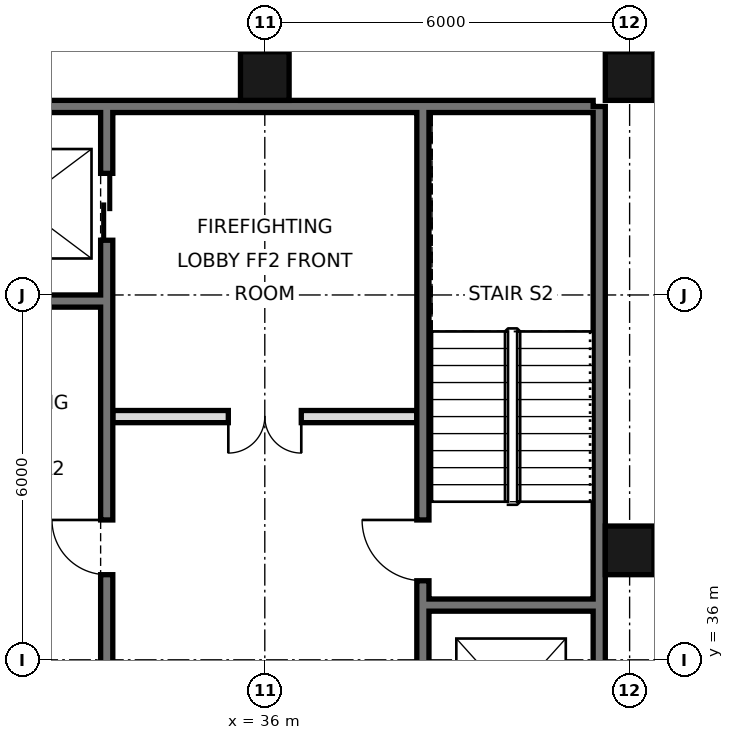
"""IFC4 building model, lengths in metres.
Left out: names, types, materials, properties, quantities, classifications, styles, units other than length and angle.
Written with IfcOpenShell. Run it as: python <this file> out.ifc"""

import sys

from ifc_helpers import new_model, si_unit, direction, frame, frame_2d, origin, origin_2d, place, context, subcontext, project, spatial, rectangle, hollow_rectangle, extrude, element, fill, save


model = new_model("IFC4")
c1 = context("Model", 3, precision=1e-05, world=origin(), true_north=direction((0.0, 1.0)))
c2 = subcontext(c1, "Body", "Model", "MODEL_VIEW")
j1 = project(units=[si_unit("LENGTHUNIT", "METRE"), si_unit("PLANEANGLEUNIT", "RADIAN")], contexts=[c1])
p1 = place(None, origin())
s1 = spatial("IfcSite", under=j1, at=p1, CompositionType="ELEMENT")
p2 = place(p1, origin())
s2 = spatial("IfcBuilding", under=s1, at=p2, CompositionType="ELEMENT")
p3 = place(p2, frame((0.0, 0.0, 239.6)))
s3 = spatial("IfcBuildingStorey", under=s2, at=p3, CompositionType="ELEMENT", Elevation=239.6)
for number, where, z_axis, x_axis in (
    (1, (36.0, 45.6, 0.0), (0.0, 0.0, 1.0), (1.0, 0.0, 0.0)),
    (2, (42.0, 37.8, 0.0), (0.0, 0.0, 1.0), (1.0, 0.0, 0.0)),
    (3, (42.0, 45.6, 0.0), (0.0, 0.0, 1.0), (1.0, 0.0, 0.0)),
):
    element("IfcColumn", number, at=place(p3, frame(where, z_axis=z_axis, x_axis=x_axis)), inside=s3, PredefinedType="COLUMN", context=c2, shape_type="SweptSolid", body=[
        extrude(hollow_rectangle(XDim=0.8, YDim=0.8, WallThickness=0.04, at=origin_2d()), origin(), (0.0, 0.0, 1.0), 3.6),
    ])
p4 = place(p3, frame((41.5, 21.6, 0.0), z_axis=(0.0, 0.0, 1.0), x_axis=(0.0, 1.0, 0.0)))
e4 = element("IfcWall", 4, at=p4, inside=s3, PredefinedType="SOLIDWALL", context=c2, shape_type="SweptSolid", body=[
    extrude(rectangle(XDim=23.5, YDim=0.2, at=frame_2d((11.75, 0.0))), origin(), (0.0, 0.0, 1.0), 3.42),
])
p5 = place(p3, frame((6.6, 45.1, 0.0), z_axis=(0.0, 0.0, 1.0), x_axis=(1.0, 0.0, 0.0)))
e5 = element("IfcWall", 5, at=p5, inside=s3, PredefinedType="SOLIDWALL", context=c2, shape_type="SweptSolid", body=[
    extrude(rectangle(XDim=34.8, YDim=0.2, at=frame_2d((17.4, 0.0))), origin(), (0.0, 0.0, 1.0), 3.42),
])
p6 = place(p3, frame((33.4, 27.5, 0.0), z_axis=(0.0, 0.0, 1.0), x_axis=(0.0, 1.0, 0.0)))
e6 = element("IfcWall", 6, at=p6, inside=s3, PredefinedType="SOLIDWALL", context=c2, shape_type="SweptSolid", body=[
    extrude(rectangle(XDim=17.5, YDim=0.2, at=frame_2d((8.75, 0.0))), origin(), (0.0, 0.0, 1.0), 3.42),
])
p7 = place(p6, frame((1.1, 0.0, 0.0)))
e7 = element("IfcOpeningElement", 7, at=p7, cuts=e6, PredefinedType="OPENING", context=c2, shape_type="SweptSolid", body=[
    extrude(rectangle(XDim=1.1, YDim=2.1, at=frame_2d((0.55, 1.05))), frame((0.0, 0.11, 0.0), z_axis=(0.0, -1.0, 0.0), x_axis=(1.0, 0.0, 0.0)), (0.0, 0.0, 1.0), 0.22),
])
p8 = place(p6, frame((4.2, 0.0, 0.0)))
e8 = element("IfcOpeningElement", 8, at=p8, cuts=e6, PredefinedType="OPENING", context=c2, shape_type="SweptSolid", body=[
    extrude(rectangle(XDim=1.1, YDim=2.1, at=frame_2d((0.55, 1.05))), frame((0.0, 0.11, 0.0), z_axis=(0.0, -1.0, 0.0), x_axis=(1.0, 0.0, 0.0)), (0.0, 0.0, 1.0), 0.22),
])
p9 = place(p6, frame((15.4, 0.0, 0.0)))
e9 = element("IfcOpeningElement", 9, at=p9, cuts=e6, PredefinedType="OPENING", context=c2, shape_type="SweptSolid", body=[
    extrude(rectangle(XDim=1.1, YDim=2.1, at=frame_2d((0.55, 1.05))), frame((0.0, 0.11, 0.0), z_axis=(0.0, -1.0, 0.0), x_axis=(1.0, 0.0, 0.0)), (0.0, 0.0, 1.0), 0.22),
])
p10 = place(p6, frame((9.9, 0.0, 0.0)))
e10 = element("IfcOpeningElement", 10, at=p10, cuts=e6, PredefinedType="OPENING", context=c2, shape_type="SweptSolid", body=[
    extrude(rectangle(XDim=0.9, YDim=2.1, at=frame_2d((0.45, 1.05))), frame((0.0, 0.11, 0.0), z_axis=(0.0, -1.0, 0.0), x_axis=(1.0, 0.0, 0.0)), (0.0, 0.0, 1.0), 0.22),
])
p11 = place(p3, frame((38.6, 21.6, 0.0), z_axis=(0.0, 0.0, 1.0), x_axis=(0.0, 1.0, 0.0)))
e11 = element("IfcWall", 11, at=p11, inside=s3, PredefinedType="SOLIDWALL", context=c2, shape_type="SweptSolid", body=[
    extrude(rectangle(XDim=23.4, YDim=0.2, at=frame_2d((11.7, 0.0))), origin(), (0.0, 0.0, 1.0), 3.42),
])
p12 = place(p11, frame((7.0, 0.0, 0.0)))
e12 = element("IfcOpeningElement", 12, at=p12, cuts=e11, PredefinedType="OPENING", context=c2, shape_type="SweptSolid", body=[
    extrude(rectangle(XDim=1.1, YDim=2.1, at=frame_2d((0.55, 1.05))), frame((0.0, 0.11, 0.0), z_axis=(0.0, -1.0, 0.0), x_axis=(1.0, 0.0, 0.0)), (0.0, 0.0, 1.0), 0.22),
])
p13 = place(p11, frame((10.1, 0.0, 0.0)))
e13 = element("IfcOpeningElement", 13, at=p13, cuts=e11, PredefinedType="OPENING", context=c2, shape_type="SweptSolid", body=[
    extrude(rectangle(XDim=1.1, YDim=2.1, at=frame_2d((0.55, 1.05))), frame((0.0, 0.11, 0.0), z_axis=(0.0, -1.0, 0.0), x_axis=(1.0, 0.0, 0.0)), (0.0, 0.0, 1.0), 0.22),
])
p14 = place(p11, frame((13.2, 0.0, 0.0)))
e14 = element("IfcOpeningElement", 14, at=p14, cuts=e11, PredefinedType="OPENING", context=c2, shape_type="SweptSolid", body=[
    extrude(rectangle(XDim=1.1, YDim=2.1, at=frame_2d((0.55, 1.05))), frame((0.0, 0.11, 0.0), z_axis=(0.0, -1.0, 0.0), x_axis=(1.0, 0.0, 0.0)), (0.0, 0.0, 1.0), 0.22),
])
p15 = place(p11, frame((15.7, 0.0, 0.0)))
e15 = element("IfcOpeningElement", 15, at=p15, cuts=e11, PredefinedType="OPENING", context=c2, shape_type="SweptSolid", body=[
    extrude(rectangle(XDim=1.0, YDim=2.1, at=frame_2d((0.5, 1.05))), frame((0.0, 0.11, 0.0), z_axis=(0.0, -1.0, 0.0), x_axis=(1.0, 0.0, 0.0)), (0.0, 0.0, 1.0), 0.22),
])
p16 = place(p11, frame((0.175, 0.0, 0.0)))
e16 = element("IfcOpeningElement", 16, at=p16, cuts=e11, PredefinedType="OPENING", context=c2, shape_type="SweptSolid", body=[
    extrude(rectangle(XDim=0.9, YDim=2.1, at=frame_2d((0.45, 1.05))), frame((0.0, 0.11, 0.0), z_axis=(0.0, -1.0, 0.0), x_axis=(1.0, 0.0, 0.0)), (0.0, 0.0, 1.0), 0.22),
])
p17 = place(p3, frame((38.7, 36.9, 0.0), z_axis=(0.0, 0.0, 1.0), x_axis=(1.0, 0.0, 0.0)))
e17 = element("IfcWall", 17, at=p17, inside=s3, PredefinedType="SOLIDWALL", context=c2, shape_type="SweptSolid", body=[
    extrude(rectangle(XDim=2.7, YDim=0.2, at=frame_2d((1.35, 0.0))), origin(), (0.0, 0.0, 1.0), 3.42),
])
p18 = place(p3, frame((33.5, 40.0, 0.0), z_axis=(0.0, 0.0, 1.0), x_axis=(1.0, 0.0, 0.0)))
e18 = element("IfcWall", 18, at=p18, inside=s3, PredefinedType="PARTITIONING", context=c2, shape_type="SweptSolid", body=[
    extrude(rectangle(XDim=5.0, YDim=0.2, at=frame_2d((2.5, 0.0))), origin(), (0.0, 0.0, 1.0), 3.42),
])
p19 = place(p18, frame((1.9, 0.0, 0.0)))
e19 = element("IfcOpeningElement", 19, at=p19, cuts=e18, PredefinedType="OPENING", context=c2, shape_type="SweptSolid", body=[
    extrude(rectangle(XDim=1.2, YDim=2.1, at=frame_2d((0.6, 1.05))), frame((0.0, 0.11, 0.0), z_axis=(0.0, -1.0, 0.0), x_axis=(1.0, 0.0, 0.0)), (0.0, 0.0, 1.0), 0.22),
])
p20 = place(p3, frame((30.6, 41.9, 0.0), z_axis=(0.0, 0.0, 1.0), x_axis=(1.0, 0.0, 0.0)))
e20 = element("IfcWall", 20, at=p20, inside=s3, PredefinedType="SOLIDWALL", context=c2, shape_type="SweptSolid", body=[
    extrude(rectangle(XDim=2.7, YDim=0.2, at=frame_2d((1.35, 0.0))), origin(), (0.0, 0.0, 1.0), 3.42),
])
p21 = place(p19, frame((1.2, 0.0, 0.0), z_axis=(0.0, 0.0, 1.0), x_axis=(-1.0, 0.0, 0.0)))
e21 = element("IfcDoor", 21, at=p21, inside=s3, OperationType="DOUBLE_DOOR_SINGLE_SWING", PredefinedType="DOOR", context=c2, shape_type="SweptSolid", body=[
    extrude(rectangle(XDim=1.2, YDim=2.1, at=frame_2d((0.6, 1.05))), frame((0.0, 0.025, 0.0), z_axis=(0.0, -1.0, 0.0), x_axis=(1.0, 0.0, 0.0)), (0.0, 0.0, 1.0), 0.05),
])
fill(e19, e21)
p22 = place(p9, origin())
e22 = element("IfcDoor", 22, at=p22, inside=s3, OperationType="DOUBLE_DOOR_SLIDING", PredefinedType="DOOR", context=c2, shape_type="SweptSolid", body=[
    extrude(rectangle(XDim=1.1, YDim=2.1, at=frame_2d((0.55, 1.05))), frame((0.0, 0.025, 0.0), z_axis=(0.0, -1.0, 0.0), x_axis=(1.0, 0.0, 0.0)), (0.0, 0.0, 1.0), 0.05),
])
fill(e9, e22)
p23 = place(p15, frame((1.0, 0.0, 0.0), z_axis=(0.0, 0.0, 1.0), x_axis=(-1.0, 0.0, 0.0)))
e23 = element("IfcDoor", 23, at=p23, inside=s3, OperationType="SINGLE_SWING_LEFT", PredefinedType="DOOR", context=c2, shape_type="SweptSolid", body=[
    extrude(rectangle(XDim=1.0, YDim=2.1, at=frame_2d((0.5, 1.05))), frame((0.0, 0.025, 0.0), z_axis=(0.0, -1.0, 0.0), x_axis=(1.0, 0.0, 0.0)), (0.0, 0.0, 1.0), 0.05),
])
fill(e15, e23)
p24 = place(p10, frame((0.9, 0.0, 0.0), z_axis=(0.0, 0.0, 1.0), x_axis=(-1.0, 0.0, 0.0)))
e24 = element("IfcDoor", 24, at=p24, inside=s3, OperationType="SINGLE_SWING_LEFT", PredefinedType="DOOR", context=c2, shape_type="SweptSolid", body=[
    extrude(rectangle(XDim=0.9, YDim=2.1, at=frame_2d((0.45, 1.05))), frame((0.0, 0.025, 0.0), z_axis=(0.0, -1.0, 0.0), x_axis=(1.0, 0.0, 0.0)), (0.0, 0.0, 1.0), 0.05),
])
fill(e10, e24)
save(model, sys.argv[1])
